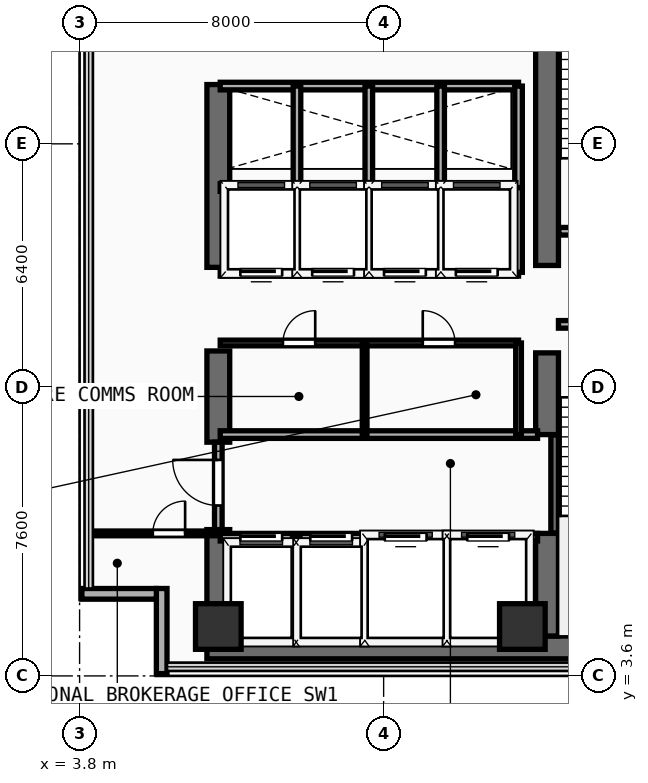
"""IFC4 building model, lengths in metres.
Left out: names, types, materials, properties, quantities, classifications, styles, units other than length and angle.
Written with IfcOpenShell. Run it as: python <this file> out.ifc"""

import sys

from ifc_helpers import new_model, si_unit, direction, frame, frame_2d, origin, origin_2d, place, context, subcontext, project, spatial, rectangle, extrude, element, fill, save


model = new_model("IFC4")
c1 = context("Model", 3, precision=1e-05, world=origin(), true_north=direction((0.0, 1.0)))
c2 = subcontext(c1, "Body", "Model", "MODEL_VIEW")
j1 = project(units=[si_unit("LENGTHUNIT", "METRE"), si_unit("PLANEANGLEUNIT", "RADIAN")], contexts=[c1])
p1 = place(None, origin())
s1 = spatial("IfcSite", under=j1, at=p1, CompositionType="ELEMENT")
p2 = place(p1, origin())
s2 = spatial("IfcBuilding", under=s1, at=p2, CompositionType="ELEMENT")
p3 = place(p2, frame((0.0, 0.0, 184.2)))
s3 = spatial("IfcBuildingStorey", under=s2, at=p3, CompositionType="ELEMENT", Elevation=184.2)
p4 = place(p3, frame((7.15, 4.35, 0.0), z_axis=(0.0, 0.0, 1.0), x_axis=(1.0, 0.0, 0.0)))
e1 = element("IfcWall", 1, at=p4, inside=s3, PredefinedType="SHEAR", context=c2, shape_type="SweptSolid", body=[
    extrude(rectangle(XDim=13.95, YDim=0.6, at=frame_2d((6.975, 0.0))), origin(), (0.0, 0.0, 1.0), 3.56),
])
p5 = place(p3, frame((7.45, 4.65, 0.0), z_axis=(0.0, 0.0, 1.0), x_axis=(0.0, 1.0, 0.0)))
e2 = element("IfcWall", 2, at=p5, inside=s3, PredefinedType="SHEAR", context=c2, shape_type="SweptSolid", body=[
    extrude(rectangle(XDim=2.8, YDim=0.6, at=frame_2d((1.4, 0.0))), origin(), (0.0, 0.0, 1.0), 3.56),
])
p6 = place(p3, frame((7.45, 9.75, 0.0), z_axis=(0.0, 0.0, 1.0), x_axis=(0.0, 1.0, 0.0)))
e3 = element("IfcWall", 3, at=p6, inside=s3, PredefinedType="SHEAR", context=c2, shape_type="SweptSolid", body=[
    extrude(rectangle(XDim=2.4, YDim=0.6, at=frame_2d((1.2, 0.0))), origin(), (0.0, 0.0, 1.0), 3.56),
])
p7 = place(p3, frame((7.45, 14.35, 0.0), z_axis=(0.0, 0.0, 1.0), x_axis=(0.0, 1.0, 0.0)))
e4 = element("IfcWall", 4, at=p7, inside=s3, PredefinedType="SHEAR", context=c2, shape_type="SweptSolid", body=[
    extrude(rectangle(XDim=4.81, YDim=0.6, at=frame_2d((2.405, 0.0))), origin(), (0.0, 0.0, 1.0), 3.56),
])
p8 = place(p3, frame((16.1, 4.65, 0.0), z_axis=(0.0, 0.0, 1.0), x_axis=(0.0, 1.0, 0.0)))
e5 = element("IfcWall", 5, at=p8, inside=s3, PredefinedType="SHEAR", context=c2, shape_type="SweptSolid", body=[
    extrude(rectangle(XDim=2.7, YDim=0.6, at=frame_2d((1.35, 0.0))), origin(), (0.0, 0.0, 1.0), 3.56),
])
p9 = place(p3, frame((16.1, 9.95, 0.0), z_axis=(0.0, 0.0, 1.0), x_axis=(0.0, 1.0, 0.0)))
e6 = element("IfcWall", 6, at=p9, inside=s3, PredefinedType="SHEAR", context=c2, shape_type="SweptSolid", body=[
    extrude(rectangle(XDim=2.15, YDim=0.6, at=frame_2d((1.075, 0.0))), origin(), (0.0, 0.0, 1.0), 3.56),
])
p10 = place(p3, frame((16.1, 14.4, 0.0), z_axis=(0.0, 0.0, 1.0), x_axis=(0.0, 1.0, 0.0)))
e7 = element("IfcWall", 7, at=p10, inside=s3, PredefinedType="SHEAR", context=c2, shape_type="SweptSolid", body=[
    extrude(rectangle(XDim=9.1, YDim=0.6, at=frame_2d((4.55, 0.0))), origin(), (0.0, 0.0, 1.0), 3.56),
])
for number, where, z_axis, x_axis in (
    (8, (7.45, 4.9, 0.0), (0.0, 0.0, 1.0), (1.0, 0.0, 0.0)),
    (9, (15.45, 4.9, 0.0), (0.0, 0.0, 1.0), (1.0, 0.0, 0.0)),
):
    element("IfcColumn", number, at=place(p3, frame(where, z_axis=z_axis, x_axis=x_axis)), inside=s3, PredefinedType="COLUMN", context=c2, shape_type="SweptSolid", body=[
        extrude(rectangle(XDim=1.2, YDim=1.2, at=origin_2d()), origin(), (0.0, 0.0, 1.0), 3.56),
    ])
p11 = place(p3, frame((5.96, 3.66, 0.0), z_axis=(0.0, 0.0, 1.0), x_axis=(0.0, 1.0, 0.0)))
e10 = element("IfcWall", 10, at=p11, inside=s3, PredefinedType="SOLIDWALL", context=c2, shape_type="SweptSolid", body=[
    extrude(rectangle(XDim=2.24, YDim=0.28, at=frame_2d((1.12, 0.0))), origin(), (0.0, 0.0, 1.0), 3.56),
])
p12 = place(p3, frame((3.86, 5.76, 0.0), z_axis=(0.0, 0.0, 1.0), x_axis=(1.0, 0.0, 0.0)))
e11 = element("IfcWall", 11, at=p12, inside=s3, PredefinedType="SOLIDWALL", context=c2, shape_type="SweptSolid", body=[
    extrude(rectangle(XDim=1.96, YDim=0.28, at=frame_2d((0.98, 0.0))), origin(), (0.0, 0.0, 1.0), 3.56),
])
p13 = place(p3, frame((16.3, 7.36, 0.0), z_axis=(0.0, 0.0, 1.0), x_axis=(0.0, 1.0, 0.0)))
e12 = element("IfcWall", 12, at=p13, inside=s3, PredefinedType="SHEAR", context=c2, shape_type="SweptSolid", body=[
    extrude(rectangle(XDim=2.58, YDim=0.2, at=frame_2d((1.29, 0.0))), origin(), (0.0, 0.0, 1.0), 3.56),
])
p14 = place(p3, frame((16.4, 12.85, 0.0), z_axis=(0.0, 0.0, 1.0), x_axis=(1.0, 0.0, 0.0)))
e13 = element("IfcWall", 13, at=p14, inside=s3, PredefinedType="PARTITIONING", context=c2, shape_type="SweptSolid", body=[
    extrude(rectangle(XDim=3.96, YDim=0.2, at=frame_2d((1.98, 0.0))), origin(), (0.0, 0.0, 1.0), 3.56),
])
p15 = place(p14, frame((1.304, 0.0, 0.0)))
e14 = element("IfcOpeningElement", 14, at=p15, cuts=e13, PredefinedType="OPENING", context=c2, shape_type="SweptSolid", body=[
    extrude(rectangle(XDim=1.1, YDim=2.2, at=frame_2d((0.55, 1.1))), frame((0.0, 0.11, 0.0), z_axis=(0.0, -1.0, 0.0), x_axis=(1.0, 0.0, 0.0)), (0.0, 0.0, 1.0), 0.22),
])
p16 = place(p3, frame((16.41, 15.3, 0.0), z_axis=(0.0, 0.0, 1.0), x_axis=(1.0, 0.0, 0.0)))
e15 = element("IfcWall", 15, at=p16, inside=s3, PredefinedType="PARTITIONING", context=c2, shape_type="SweptSolid", body=[
    extrude(rectangle(XDim=3.95, YDim=0.2, at=frame_2d((1.975, 0.0))), origin(), (0.0, 0.0, 1.0), 3.56),
])
p17 = place(p16, frame((1.294, 0.0, 0.0)))
e16 = element("IfcOpeningElement", 16, at=p17, cuts=e15, PredefinedType="OPENING", context=c2, shape_type="SweptSolid", body=[
    extrude(rectangle(XDim=1.1, YDim=2.2, at=frame_2d((0.55, 1.1))), frame((0.0, 0.11, 0.0), z_axis=(0.0, -1.0, 0.0), x_axis=(1.0, 0.0, 0.0)), (0.0, 0.0, 1.0), 0.22),
])
p18 = place(p3, frame((7.5, 7.25, 0.0), z_axis=(0.0, 0.0, 1.0), x_axis=(1.0, 0.0, 0.0)))
e17 = element("IfcWall", 17, at=p18, inside=s3, PredefinedType="PARTITIONING", context=c2, shape_type="SweptSolid", body=[
    extrude(rectangle(XDim=8.35, YDim=0.2, at=frame_2d((4.175, 0.0))), origin(), (0.0, 0.0, 1.0), 3.56),
])
p19 = place(p18, frame((0.53, 0.0, 0.0)))
e18 = element("IfcOpeningElement", 18, at=p19, cuts=e17, PredefinedType="OPENING", context=c2, shape_type="SweptSolid", body=[
    extrude(rectangle(XDim=1.1, YDim=2.2, at=frame_2d((0.55, 1.1))), frame((0.0, 0.11, 0.0), z_axis=(0.0, -1.0, 0.0), x_axis=(1.0, 0.0, 0.0)), (0.0, 0.0, 1.0), 0.22),
])
p20 = place(p18, frame((2.37, 0.0, 0.0)))
e19 = element("IfcOpeningElement", 19, at=p20, cuts=e17, PredefinedType="OPENING", context=c2, shape_type="SweptSolid", body=[
    extrude(rectangle(XDim=1.1, YDim=2.2, at=frame_2d((0.55, 1.1))), frame((0.0, 0.11, 0.0), z_axis=(0.0, -1.0, 0.0), x_axis=(1.0, 0.0, 0.0)), (0.0, 0.0, 1.0), 0.22),
])
p21 = place(p18, frame((4.33, 0.0, 0.0)))
e20 = element("IfcOpeningElement", 20, at=p21, cuts=e17, PredefinedType="OPENING", context=c2, shape_type="SweptSolid", body=[
    extrude(rectangle(XDim=1.1, YDim=2.2, at=frame_2d((0.55, 1.1))), frame((0.0, 0.11, 0.0), z_axis=(0.0, -1.0, 0.0), x_axis=(1.0, 0.0, 0.0)), (0.0, 0.0, 1.0), 0.22),
])
p22 = place(p18, frame((6.5, 0.0, 0.0)))
e21 = element("IfcOpeningElement", 21, at=p22, cuts=e17, PredefinedType="OPENING", context=c2, shape_type="SweptSolid", body=[
    extrude(rectangle(XDim=1.1, YDim=2.2, at=frame_2d((0.55, 1.1))), frame((0.0, 0.11, 0.0), z_axis=(0.0, -1.0, 0.0), x_axis=(1.0, 0.0, 0.0)), (0.0, 0.0, 1.0), 0.22),
])
p23 = place(p3, frame((7.5, 9.95, 0.0), z_axis=(0.0, 0.0, 1.0), x_axis=(1.0, 0.0, 0.0)))
e22 = element("IfcWall", 22, at=p23, inside=s3, PredefinedType="PARTITIONING", context=c2, shape_type="SweptSolid", body=[
    extrude(rectangle(XDim=8.35, YDim=0.2, at=frame_2d((4.175, 0.0))), origin(), (0.0, 0.0, 1.0), 3.56),
])
for number, where, z_axis, x_axis in (
    (23, (9.5, 4.45, 0.0), (0.0, 0.0, 1.0), (0.0, 1.0, 0.0)),
    (24, (11.36, 4.45, 0.0), (0.0, 0.0, 1.0), (0.0, 1.0, 0.0)),
    (25, (13.46, 4.45, 0.0), (0.0, 0.0, 1.0), (0.0, 1.0, 0.0)),
):
    element("IfcWall", number, at=place(p3, frame(where, z_axis=z_axis, x_axis=x_axis)), inside=s3, PredefinedType="PARTITIONING", context=c2, shape_type="SweptSolid", body=[
        extrude(rectangle(XDim=2.8, YDim=0.2, at=frame_2d((1.4, 0.0))), origin(), (0.0, 0.0, 1.0), 3.56),
    ])
p24 = place(p3, frame((7.45, 7.45, 0.0), z_axis=(0.0, 0.0, 1.0), x_axis=(0.0, 1.0, 0.0)))
e26 = element("IfcWall", 26, at=p24, inside=s3, PredefinedType="PARTITIONING", context=c2, shape_type="SweptSolid", body=[
    extrude(rectangle(XDim=2.3, YDim=0.2, at=frame_2d((1.15, 0.0))), origin(), (0.0, 0.0, 1.0), 2.54),
])
p25 = place(p24, frame((0.633, 0.0, 0.0)))
e27 = element("IfcOpeningElement", 27, at=p25, cuts=e26, PredefinedType="OPENING", context=c2, shape_type="SweptSolid", body=[
    extrude(rectangle(XDim=1.2, YDim=2.25, at=frame_2d((0.6, 1.125))), frame((0.0, 0.11, 0.0), z_axis=(0.0, -1.0, 0.0), x_axis=(1.0, 0.0, 0.0)), (0.0, 0.0, 1.0), 0.22),
])
p26 = place(p3, frame((7.5, 12.36, 0.0), z_axis=(0.0, 0.0, 1.0), x_axis=(1.0, 0.0, 0.0)))
e28 = element("IfcWall", 28, at=p26, inside=s3, PredefinedType="PARTITIONING", context=c2, shape_type="SweptSolid", body=[
    extrude(rectangle(XDim=7.85, YDim=0.15, at=frame_2d((3.925, 0.0))), origin(), (0.0, 0.0, 1.0), 3.56),
])
p27 = place(p26, frame((1.65, 0.0, 0.0)))
e29 = element("IfcOpeningElement", 29, at=p27, cuts=e28, PredefinedType="OPENING", context=c2, shape_type="SweptSolid", body=[
    extrude(rectangle(XDim=0.85, YDim=2.15, at=frame_2d((0.425, 1.075))), frame((0.0, 0.085, 0.0), z_axis=(0.0, -1.0, 0.0), x_axis=(1.0, 0.0, 0.0)), (0.0, 0.0, 1.0), 0.17),
])
p28 = place(p26, frame((5.329, 0.0, 0.0)))
e30 = element("IfcOpeningElement", 30, at=p28, cuts=e28, PredefinedType="OPENING", context=c2, shape_type="SweptSolid", body=[
    extrude(rectangle(XDim=0.85, YDim=2.15, at=frame_2d((0.425, 1.075))), frame((0.0, 0.085, 0.0), z_axis=(0.0, -1.0, 0.0), x_axis=(1.0, 0.0, 0.0)), (0.0, 0.0, 1.0), 0.17),
])
p29 = place(p3, frame((15.35, 9.95, 0.0), z_axis=(0.0, 0.0, 1.0), x_axis=(0.0, 1.0, 0.0)))
e31 = element("IfcWall", 31, at=p29, inside=s3, PredefinedType="PARTITIONING", context=c2, shape_type="SweptSolid", body=[
    extrude(rectangle(XDim=2.41, YDim=0.15, at=frame_2d((1.205, 0.0))), origin(), (0.0, 0.0, 1.0), 3.56),
])
p30 = place(p3, frame((11.3, 9.95, 0.0), z_axis=(0.0, 0.0, 1.0), x_axis=(0.0, 1.0, 0.0)))
e32 = element("IfcWall", 32, at=p30, inside=s3, PredefinedType="PARTITIONING", context=c2, shape_type="SweptSolid", body=[
    extrude(rectangle(XDim=2.41, YDim=0.125, at=frame_2d((1.205, 0.0))), origin(), (0.0, 0.0, 1.0), 3.56),
])
p31 = place(p3, frame((7.5, 14.22, 0.0), z_axis=(0.0, 0.0, 1.0), x_axis=(1.0, 0.0, 0.0)))
e33 = element("IfcWall", 33, at=p31, inside=s3, PredefinedType="PARTITIONING", context=c2, shape_type="SweptSolid", body=[
    extrude(rectangle(XDim=7.85, YDim=0.2, at=frame_2d((3.925, 0.0))), origin(), (0.0, 0.0, 1.0), 3.56),
])
p32 = place(p31, frame((0.53, 0.0, 0.0)))
e34 = element("IfcOpeningElement", 34, at=p32, cuts=e33, PredefinedType="OPENING", context=c2, shape_type="SweptSolid", body=[
    extrude(rectangle(XDim=1.1, YDim=2.2, at=frame_2d((0.55, 1.1))), frame((0.0, 0.11, 0.0), z_axis=(0.0, -1.0, 0.0), x_axis=(1.0, 0.0, 0.0)), (0.0, 0.0, 1.0), 0.22),
])
p33 = place(p31, frame((2.42, 0.0, 0.0)))
e35 = element("IfcOpeningElement", 35, at=p33, cuts=e33, PredefinedType="OPENING", context=c2, shape_type="SweptSolid", body=[
    extrude(rectangle(XDim=1.1, YDim=2.2, at=frame_2d((0.55, 1.1))), frame((0.0, 0.11, 0.0), z_axis=(0.0, -1.0, 0.0), x_axis=(1.0, 0.0, 0.0)), (0.0, 0.0, 1.0), 0.22),
])
p34 = place(p31, frame((4.31, 0.0, 0.0)))
e36 = element("IfcOpeningElement", 36, at=p34, cuts=e33, PredefinedType="OPENING", context=c2, shape_type="SweptSolid", body=[
    extrude(rectangle(XDim=1.1, YDim=2.2, at=frame_2d((0.55, 1.1))), frame((0.0, 0.11, 0.0), z_axis=(0.0, -1.0, 0.0), x_axis=(1.0, 0.0, 0.0)), (0.0, 0.0, 1.0), 0.22),
])
p35 = place(p31, frame((6.2, 0.0, 0.0)))
e37 = element("IfcOpeningElement", 37, at=p35, cuts=e33, PredefinedType="OPENING", context=c2, shape_type="SweptSolid", body=[
    extrude(rectangle(XDim=1.1, YDim=2.2, at=frame_2d((0.55, 1.1))), frame((0.0, 0.11, 0.0), z_axis=(0.0, -1.0, 0.0), x_axis=(1.0, 0.0, 0.0)), (0.0, 0.0, 1.0), 0.22),
])
p36 = place(p3, frame((7.5, 16.45, 0.0), z_axis=(0.0, 0.0, 1.0), x_axis=(1.0, 0.0, 0.0)))
e38 = element("IfcWall", 38, at=p36, inside=s3, PredefinedType="PARTITIONING", context=c2, shape_type="SweptSolid", body=[
    extrude(rectangle(XDim=7.85, YDim=0.2, at=frame_2d((3.925, 0.0))), origin(), (0.0, 0.0, 1.0), 3.56),
])
for number, where, z_axis, x_axis in (
    (39, (15.35, 14.22, 0.0), (0.0, 0.0, 1.0), (0.0, 1.0, 0.0)),
    (40, (9.52, 14.22, 0.0), (0.0, 0.0, 1.0), (0.0, 1.0, 0.0)),
    (41, (11.41, 14.22, 0.0), (0.0, 0.0, 1.0), (0.0, 1.0, 0.0)),
    (42, (13.3, 14.22, 0.0), (0.0, 0.0, 1.0), (0.0, 1.0, 0.0)),
):
    element("IfcWall", number, at=place(p3, frame(where, z_axis=z_axis, x_axis=x_axis)), inside=s3, PredefinedType="PARTITIONING", context=c2, shape_type="SweptSolid", body=[
        extrude(rectangle(XDim=2.23, YDim=0.2, at=frame_2d((1.115, 0.0))), origin(), (0.0, 0.0, 1.0), 3.56),
    ])
p37 = place(p3, frame((7.5, 19.12, 0.0), z_axis=(0.0, 0.0, 1.0), x_axis=(1.0, 0.0, 0.0)))
e43 = element("IfcWall", 43, at=p37, inside=s3, PredefinedType="PARTITIONING", context=c2, shape_type="SweptSolid", body=[
    extrude(rectangle(XDim=7.85, YDim=0.2, at=frame_2d((3.925, 0.0))), origin(), (0.0, 0.0, 1.0), 3.56),
])
for number, where, z_axis, x_axis in (
    (44, (15.35, 16.45, 0.0), (0.0, 0.0, 1.0), (0.0, 1.0, 0.0)),
    (45, (9.52, 16.45, 0.0), (0.0, 0.0, 1.0), (0.0, 1.0, 0.0)),
    (46, (11.41, 16.45, 0.0), (0.0, 0.0, 1.0), (0.0, 1.0, 0.0)),
    (47, (13.3, 16.45, 0.0), (0.0, 0.0, 1.0), (0.0, 1.0, 0.0)),
):
    element("IfcWall", number, at=place(p3, frame(where, z_axis=z_axis, x_axis=x_axis)), inside=s3, PredefinedType="PARTITIONING", context=c2, shape_type="SweptSolid", body=[
        extrude(rectangle(XDim=2.67, YDim=0.2, at=frame_2d((1.335, 0.0))), origin(), (0.0, 0.0, 1.0), 3.56),
    ])
p38 = place(p3, frame((4.04, 7.35, 0.0), z_axis=(0.0, 0.0, 1.0), x_axis=(1.0, 0.0, 0.0)))
e48 = element("IfcWall", 48, at=p38, inside=s3, PredefinedType="PARTITIONING", context=c2, shape_type="SweptSolid", body=[
    extrude(rectangle(XDim=3.36, YDim=0.125, at=frame_2d((1.68, 0.0))), origin(), (0.0, 0.0, 1.0), 3.56),
])
p39 = place(p38, frame((1.687, 0.0, 0.0)))
e49 = element("IfcOpeningElement", 49, at=p39, cuts=e48, PredefinedType="OPENING", context=c2, shape_type="SweptSolid", body=[
    extrude(rectangle(XDim=0.85, YDim=2.15, at=frame_2d((0.425, 1.075))), frame((0.0, 0.073, 0.0), z_axis=(0.0, -1.0, 0.0), x_axis=(1.0, 0.0, 0.0)), (0.0, 0.0, 1.0), 0.145),
])
p40 = place(p19, origin())
e50 = element("IfcDoor", 50, at=p40, inside=s3, OperationType="SLIDING_TO_LEFT", PredefinedType="DOOR", context=c2, shape_type="SweptSolid", body=[
    extrude(rectangle(XDim=1.1, YDim=2.2, at=frame_2d((0.55, 1.1))), frame((0.0, 0.025, 0.0), z_axis=(0.0, -1.0, 0.0), x_axis=(1.0, 0.0, 0.0)), (0.0, 0.0, 1.0), 0.05),
])
fill(e18, e50)
p41 = place(p20, origin())
e51 = element("IfcDoor", 51, at=p41, inside=s3, OperationType="SLIDING_TO_LEFT", PredefinedType="DOOR", context=c2, shape_type="SweptSolid", body=[
    extrude(rectangle(XDim=1.1, YDim=2.2, at=frame_2d((0.55, 1.1))), frame((0.0, 0.025, 0.0), z_axis=(0.0, -1.0, 0.0), x_axis=(1.0, 0.0, 0.0)), (0.0, 0.0, 1.0), 0.05),
])
fill(e19, e51)
p42 = place(p21, origin())
e52 = element("IfcDoor", 52, at=p42, inside=s3, OperationType="SLIDING_TO_LEFT", PredefinedType="DOOR", context=c2, shape_type="SweptSolid", body=[
    extrude(rectangle(XDim=1.1, YDim=2.2, at=frame_2d((0.55, 1.1))), frame((0.0, 0.025, 0.0), z_axis=(0.0, -1.0, 0.0), x_axis=(1.0, 0.0, 0.0)), (0.0, 0.0, 1.0), 0.05),
])
fill(e20, e52)
p43 = place(p22, origin())
e53 = element("IfcDoor", 53, at=p43, inside=s3, OperationType="SLIDING_TO_LEFT", PredefinedType="DOOR", context=c2, shape_type="SweptSolid", body=[
    extrude(rectangle(XDim=1.1, YDim=2.2, at=frame_2d((0.55, 1.1))), frame((0.0, 0.025, 0.0), z_axis=(0.0, -1.0, 0.0), x_axis=(1.0, 0.0, 0.0)), (0.0, 0.0, 1.0), 0.05),
])
fill(e21, e53)
p44 = place(p25, frame((1.2, 0.0, 0.0), z_axis=(0.0, 0.0, 1.0), x_axis=(-1.0, 0.0, 0.0)))
e54 = element("IfcDoor", 54, at=p44, inside=s3, OperationType="SINGLE_SWING_LEFT", PredefinedType="DOOR", context=c2, shape_type="SweptSolid", body=[
    extrude(rectangle(XDim=1.2, YDim=2.25, at=frame_2d((0.6, 1.125))), frame((0.0, 0.025, 0.0), z_axis=(0.0, -1.0, 0.0), x_axis=(1.0, 0.0, 0.0)), (0.0, 0.0, 1.0), 0.05),
])
fill(e27, e54)
p45 = place(p27, origin())
e55 = element("IfcDoor", 55, at=p45, inside=s3, OperationType="SINGLE_SWING_RIGHT", PredefinedType="DOOR", context=c2, shape_type="SweptSolid", body=[
    extrude(rectangle(XDim=0.85, YDim=2.15, at=frame_2d((0.425, 1.075))), frame((0.0, 0.025, 0.0), z_axis=(0.0, -1.0, 0.0), x_axis=(1.0, 0.0, 0.0)), (0.0, 0.0, 1.0), 0.05),
])
fill(e29, e55)
p46 = place(p28, origin())
e56 = element("IfcDoor", 56, at=p46, inside=s3, OperationType="SINGLE_SWING_LEFT", PredefinedType="DOOR", context=c2, shape_type="SweptSolid", body=[
    extrude(rectangle(XDim=0.85, YDim=2.15, at=frame_2d((0.425, 1.075))), frame((0.0, 0.025, 0.0), z_axis=(0.0, -1.0, 0.0), x_axis=(1.0, 0.0, 0.0)), (0.0, 0.0, 1.0), 0.05),
])
fill(e30, e56)
p47 = place(p32, frame((1.1, 0.0, 0.0), z_axis=(0.0, 0.0, 1.0), x_axis=(-1.0, 0.0, 0.0)))
e57 = element("IfcDoor", 57, at=p47, inside=s3, OperationType="SLIDING_TO_LEFT", PredefinedType="DOOR", context=c2, shape_type="SweptSolid", body=[
    extrude(rectangle(XDim=1.1, YDim=2.2, at=frame_2d((0.55, 1.1))), frame((0.0, 0.025, 0.0), z_axis=(0.0, -1.0, 0.0), x_axis=(1.0, 0.0, 0.0)), (0.0, 0.0, 1.0), 0.05),
])
fill(e34, e57)
p48 = place(p33, frame((1.1, 0.0, 0.0), z_axis=(0.0, 0.0, 1.0), x_axis=(-1.0, 0.0, 0.0)))
e58 = element("IfcDoor", 58, at=p48, inside=s3, OperationType="SLIDING_TO_LEFT", PredefinedType="DOOR", context=c2, shape_type="SweptSolid", body=[
    extrude(rectangle(XDim=1.1, YDim=2.2, at=frame_2d((0.55, 1.1))), frame((0.0, 0.025, 0.0), z_axis=(0.0, -1.0, 0.0), x_axis=(1.0, 0.0, 0.0)), (0.0, 0.0, 1.0), 0.05),
])
fill(e35, e58)
p49 = place(p34, frame((1.1, 0.0, 0.0), z_axis=(0.0, 0.0, 1.0), x_axis=(-1.0, 0.0, 0.0)))
e59 = element("IfcDoor", 59, at=p49, inside=s3, OperationType="SLIDING_TO_LEFT", PredefinedType="DOOR", context=c2, shape_type="SweptSolid", body=[
    extrude(rectangle(XDim=1.1, YDim=2.2, at=frame_2d((0.55, 1.1))), frame((0.0, 0.025, 0.0), z_axis=(0.0, -1.0, 0.0), x_axis=(1.0, 0.0, 0.0)), (0.0, 0.0, 1.0), 0.05),
])
fill(e36, e59)
p50 = place(p35, frame((1.1, 0.0, 0.0), z_axis=(0.0, 0.0, 1.0), x_axis=(-1.0, 0.0, 0.0)))
e60 = element("IfcDoor", 60, at=p50, inside=s3, OperationType="SLIDING_TO_LEFT", PredefinedType="DOOR", context=c2, shape_type="SweptSolid", body=[
    extrude(rectangle(XDim=1.1, YDim=2.2, at=frame_2d((0.55, 1.1))), frame((0.0, 0.025, 0.0), z_axis=(0.0, -1.0, 0.0), x_axis=(1.0, 0.0, 0.0)), (0.0, 0.0, 1.0), 0.05),
])
fill(e37, e60)
p51 = place(p39, origin())
e61 = element("IfcDoor", 61, at=p51, inside=s3, OperationType="SINGLE_SWING_RIGHT", PredefinedType="DOOR", context=c2, shape_type="SweptSolid", body=[
    extrude(rectangle(XDim=0.85, YDim=2.15, at=frame_2d((0.425, 1.075))), frame((0.0, 0.025, 0.0), z_axis=(0.0, -1.0, 0.0), x_axis=(1.0, 0.0, 0.0)), (0.0, 0.0, 1.0), 0.05),
])
fill(e49, e61)
save(model, sys.argv[1])
